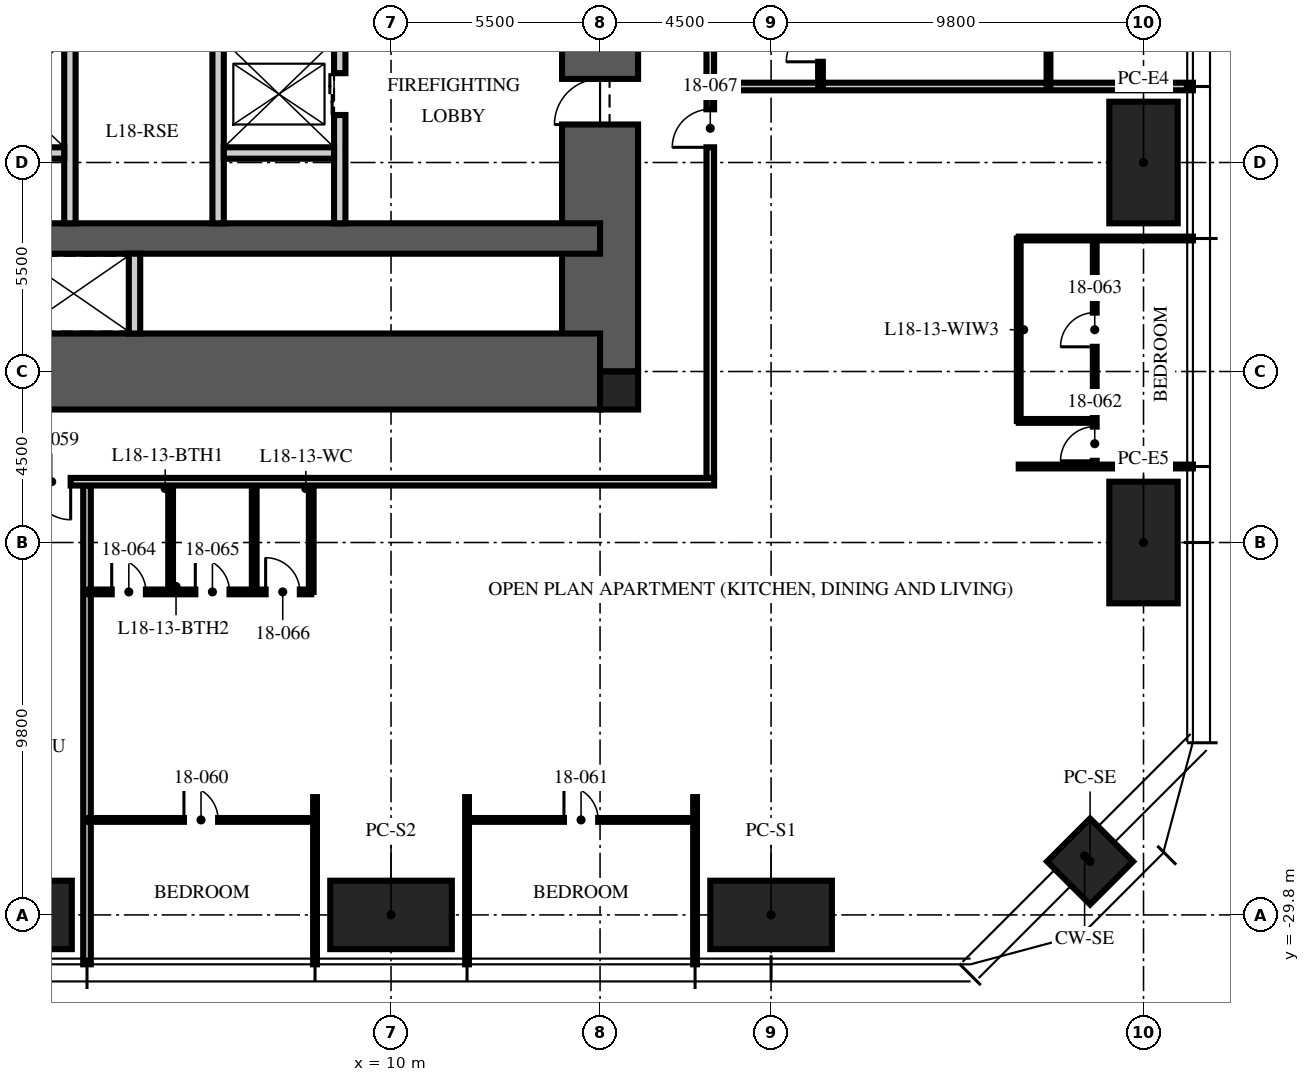
"""IFC4 building model, lengths in metres.
Left out: names, types, materials, properties, quantities, classifications, styles, units other than length and angle.
Written with IfcOpenShell. Run it as: python <this file> out.ifc"""

import sys

from ifc_helpers import new_model, si_unit, direction, frame, frame_2d, origin, origin_2d, place, context, subcontext, project, spatial, rectangle, hollow_rectangle, extrude, element, fill, save


model = new_model("IFC4")
c1 = context("Model", 3, precision=1e-05, world=origin(), true_north=direction((0.0, 1.0)))
c2 = subcontext(c1, "Body", "Model", "MODEL_VIEW")
j1 = project(units=[si_unit("LENGTHUNIT", "METRE"), si_unit("PLANEANGLEUNIT", "RADIAN")], contexts=[c1])
p1 = place(None, origin())
s1 = spatial("IfcSite", under=j1, at=p1, CompositionType="ELEMENT")
p2 = place(p1, origin())
s2 = spatial("IfcBuilding", under=s1, at=p2, CompositionType="ELEMENT")
p3 = place(p2, frame((0.0, 0.0, 73.5)))
s3 = spatial("IfcBuildingStorey", under=s2, at=p3, CompositionType="ELEMENT", Elevation=73.5)
p4 = place(p3, frame((15.5, -15.5, -0.25), z_axis=(0.0, 0.0, 1.0), x_axis=(0.0, 1.0, 0.0)))
e1 = element("IfcWall", 1, at=p4, inside=s3, PredefinedType="SHEAR", context=c2, shape_type="SweptSolid", body=[
    extrude(rectangle(XDim=31.0, YDim=2.0, at=frame_2d((15.5, 0.0))), origin(), (0.0, 0.0, 1.0), 3.75),
])
p5 = place(p4, frame((6.5, 0.0, 0.25)))
e2 = element("IfcOpeningElement", 2, at=p5, cuts=e1, PredefinedType="OPENING", context=c2, shape_type="SweptSolid", body=[
    extrude(rectangle(XDim=1.2, YDim=2.1, at=frame_2d((0.6, 1.05))), frame((0.0, 1.01, 0.0), z_axis=(0.0, -1.0, 0.0), x_axis=(1.0, 0.0, 0.0)), (0.0, 0.0, 1.0), 2.02),
])
p6 = place(p4, frame((23.0, 0.0, 0.25)))
e3 = element("IfcOpeningElement", 3, at=p6, cuts=e1, PredefinedType="OPENING", context=c2, shape_type="SweptSolid", body=[
    extrude(rectangle(XDim=1.8, YDim=2.1, at=frame_2d((0.9, 1.05))), frame((0.0, 1.01, 0.0), z_axis=(0.0, -1.0, 0.0), x_axis=(1.0, 0.0, 0.0)), (0.0, 0.0, 1.0), 2.02),
])
p7 = place(p3, frame((-15.5, -15.5, -0.25), z_axis=(0.0, 0.0, 1.0), x_axis=(1.0, 0.0, 0.0)))
e4 = element("IfcWall", 4, at=p7, inside=s3, PredefinedType="SHEAR", context=c2, shape_type="SweptSolid", body=[
    extrude(rectangle(XDim=31.0, YDim=2.0, at=frame_2d((15.5, 0.0))), origin(), (0.0, 0.0, 1.0), 3.75),
])
p8 = place(p3, frame((-15.5, -12.0, -0.25), z_axis=(0.0, 0.0, 1.0), x_axis=(1.0, 0.0, 0.0)))
e5 = element("IfcWall", 5, at=p8, inside=s3, PredefinedType="SHEAR", context=c2, shape_type="SweptSolid", body=[
    extrude(rectangle(XDim=31.0, YDim=0.8, at=frame_2d((15.5, 0.0))), origin(), (0.0, 0.0, 1.0), 3.75),
])
p9 = place(p3, frame((16.0, -16.0, -0.25), z_axis=(0.0, 0.0, 1.0), x_axis=(1.0, 0.0, 0.0)))
e6 = element("IfcColumn", 6, at=p9, inside=s3, PredefinedType="COLUMN", context=c2, shape_type="SweptSolid", body=[
    extrude(rectangle(XDim=1.0, YDim=1.0, at=origin_2d()), origin(), (0.0, 0.0, 1.0), 3.75),
])
for number, where, z_axis, x_axis in (
    (7, (29.8, -10.0, 0.0), (0.0, 0.0, 1.0), (0.0, 1.0, 0.0)),
    (8, (29.8, -20.0, 0.0), (0.0, 0.0, 1.0), (0.0, 1.0, 0.0)),
    (9, (20.0, -29.8, 0.0), (0.0, 0.0, 1.0), (1.0, 0.0, 0.0)),
    (10, (10.0, -29.8, 0.0), (0.0, 0.0, 1.0), (1.0, 0.0, 0.0)),
    (11, (0.0, -29.8, 0.0), (0.0, 0.0, 1.0), (1.0, 0.0, 0.0)),
):
    element("IfcColumn", number, at=place(p3, frame(where, z_axis=z_axis, x_axis=x_axis)), inside=s3, PredefinedType="COLUMN", context=c2, shape_type="SweptSolid", body=[
        extrude(hollow_rectangle(XDim=3.2, YDim=1.8, WallThickness=0.2, at=origin_2d()), origin(), (0.0, 0.0, 1.0), 3.75),
    ])
p10 = place(p3, frame((28.394, -28.394, 0.0), z_axis=(0.0, 0.0, 1.0), x_axis=(0.707106781187, 0.707106781187, 0.0)))
e12 = element("IfcColumn", 12, at=p10, inside=s3, PredefinedType="COLUMN", context=c2, shape_type="SweptSolid", body=[
    extrude(hollow_rectangle(XDim=1.6, YDim=1.6, WallThickness=0.1, at=origin_2d()), origin(), (0.0, 0.0, 1.0), 3.75),
])
p11 = place(p3, frame((8.65, -11.6, 0.0), z_axis=(0.0, 0.0, 1.0), x_axis=(0.0, 1.0, 0.0)))
e13 = element("IfcWall", 13, at=p11, inside=s3, PredefinedType="PARTITIONING", context=c2, shape_type="SweptSolid", body=[
    extrude(rectangle(XDim=6.7, YDim=0.3, at=frame_2d((3.35, 0.0))), origin(), (0.0, 0.0, 1.0), 3.5),
])
p12 = place(p11, frame((2.85, 0.0, 0.0)))
e14 = element("IfcOpeningElement", 14, at=p12, cuts=e13, PredefinedType="OPENING", context=c2, shape_type="SweptSolid", body=[
    extrude(rectangle(XDim=1.1, YDim=2.1, at=frame_2d((0.55, 1.05))), frame((0.0, 0.16, 0.0), z_axis=(0.0, -1.0, 0.0), x_axis=(1.0, 0.0, 0.0)), (0.0, 0.0, 1.0), 0.32),
])
for number, where, z_axis, x_axis in (
    (15, (1.55, -11.6, 0.0), (0.0, 0.0, 1.0), (0.0, 1.0, 0.0)),
    (16, (5.45, -11.6, 0.0), (0.0, 0.0, 1.0), (0.0, 1.0, 0.0)),
):
    element("IfcWall", number, at=place(p3, frame(where, z_axis=z_axis, x_axis=x_axis)), inside=s3, PredefinedType="PARTITIONING", context=c2, shape_type="SweptSolid", body=[
        extrude(rectangle(XDim=4.8, YDim=0.3, at=frame_2d((2.4, 0.0))), origin(), (0.0, 0.0, 1.0), 3.5),
    ])
for number, where, z_axis, x_axis in (
    (17, (-1.5, -9.75, 0.0), (0.0, 0.0, 1.0), (1.0, 0.0, 0.0)),
    (18, (5.6, -9.75, 0.0), (0.0, 0.0, 1.0), (1.0, 0.0, 0.0)),
):
    element("IfcWall", number, at=place(p3, frame(where, z_axis=z_axis, x_axis=x_axis)), inside=s3, PredefinedType="PARTITIONING", context=c2, shape_type="SweptSolid", body=[
        extrude(rectangle(XDim=2.9, YDim=0.3, at=frame_2d((1.45, 0.0))), origin(), (0.0, 0.0, 1.0), 3.5),
    ])
p13 = place(p3, frame((3.25, -14.5, 0.0), z_axis=(0.0, 0.0, 1.0), x_axis=(0.0, 1.0, 0.0)))
e19 = element("IfcWall", 19, at=p13, inside=s3, PredefinedType="PARTITIONING", context=c2, shape_type="SweptSolid", body=[
    extrude(rectangle(XDim=2.1, YDim=0.3, at=frame_2d((1.05, 0.0))), origin(), (0.0, 0.0, 1.0), 3.5),
])
for number, where, z_axis, x_axis in (
    (20, (18.5, -8.0, 0.0), (0.0, 0.0, 1.0), (1.0, 0.0, 0.0)),
    (21, (2.0, -18.5, 0.0), (0.0, 0.0, 1.0), (0.0, -1.0, 0.0)),
):
    element("IfcWall", number, at=place(p3, frame(where, z_axis=z_axis, x_axis=x_axis)), inside=s3, PredefinedType="PARTITIONING", context=c2, shape_type="SweptSolid", body=[
        extrude(rectangle(XDim=12.6, YDim=0.2, at=frame_2d((6.3, 0.0))), origin(), (0.0, 0.0, 1.0), 2.71),
    ])
for number, where, z_axis, x_axis in (
    (22, (8.0, -26.7, 0.0), (0.0, 0.0, 1.0), (0.0, -1.0, 0.0)),
    (23, (12.0, -26.7, 0.0), (0.0, 0.0, 1.0), (0.0, -1.0, 0.0)),
    (24, (18.0, -26.7, 0.0), (0.0, 0.0, 1.0), (0.0, -1.0, 0.0)),
):
    element("IfcWall", number, at=place(p3, frame(where, z_axis=z_axis, x_axis=x_axis)), inside=s3, PredefinedType="PARTITIONING", context=c2, shape_type="SweptSolid", body=[
        extrude(rectangle(XDim=4.4, YDim=0.1, at=frame_2d((2.2, 0.0))), origin(), (0.0, 0.0, 1.0), 2.71),
    ])
for number, where, z_axis, x_axis in (
    (25, (26.517, -18.0, 0.0), (0.0, 0.0, 1.0), (1.0, 0.0, 0.0)),
    (26, (26.517, -12.0, 0.0), (0.0, 0.0, 1.0), (1.0, 0.0, 0.0)),
):
    element("IfcWall", number, at=place(p3, frame(where, z_axis=z_axis, x_axis=x_axis)), inside=s3, PredefinedType="PARTITIONING", context=c2, shape_type="SweptSolid", body=[
        extrude(rectangle(XDim=4.583, YDim=0.1, at=frame_2d((2.292, 0.0))), origin(), (0.0, 0.0, 1.0), 2.71),
    ])
p14 = place(p3, frame((27.3, -8.0, 0.0), z_axis=(0.0, 0.0, 1.0), x_axis=(0.0, 1.0, 0.0)))
e27 = element("IfcWall", 27, at=p14, inside=s3, PredefinedType="PARTITIONING", context=c2, shape_type="SweptSolid", body=[
    extrude(rectangle(XDim=6.0, YDim=0.1, at=frame_2d((3.0, 0.0))), origin(), (0.0, 0.0, 1.0), 2.61),
])
p15 = place(p14, frame((2.55, 0.0, 0.0)))
e28 = element("IfcOpeningElement", 28, at=p15, cuts=e27, PredefinedType="OPENING", context=c2, shape_type="SweptSolid", body=[
    extrude(rectangle(XDim=0.9, YDim=2.1, at=frame_2d((0.45, 1.05))), frame((0.0, 0.06, 0.0), z_axis=(0.0, -1.0, 0.0), x_axis=(1.0, 0.0, 0.0)), (0.0, 0.0, 1.0), 0.12),
])
p16 = place(p3, frame((21.3, -8.0, 0.0), z_axis=(0.0, 0.0, 1.0), x_axis=(0.0, 1.0, 0.0)))
e29 = element("IfcWall", 29, at=p16, inside=s3, PredefinedType="PARTITIONING", context=c2, shape_type="SweptSolid", body=[
    extrude(rectangle(XDim=2.2, YDim=0.125, at=frame_2d((1.1, 0.0))), origin(), (0.0, 0.0, 1.0), 3.5),
])
p17 = place(p16, frame((0.65, 0.0, 0.0)))
e30 = element("IfcOpeningElement", 30, at=p17, cuts=e29, PredefinedType="OPENING", context=c2, shape_type="SweptSolid", body=[
    extrude(rectangle(XDim=0.9, YDim=2.1, at=frame_2d((0.45, 1.05))), frame((0.0, 0.073, 0.0), z_axis=(0.0, -1.0, 0.0), x_axis=(1.0, 0.0, 0.0)), (0.0, 0.0, 1.0), 0.145),
])
p18 = place(p3, frame((2.0, -27.3, 0.0), z_axis=(0.0, 0.0, 1.0), x_axis=(1.0, 0.0, 0.0)))
e31 = element("IfcWall", 31, at=p18, inside=s3, PredefinedType="PARTITIONING", context=c2, shape_type="SweptSolid", body=[
    extrude(rectangle(XDim=6.0, YDim=0.1, at=frame_2d((3.0, 0.0))), origin(), (0.0, 0.0, 1.0), 2.61),
])
p19 = place(p18, frame((2.55, 0.0, 0.0)))
e32 = element("IfcOpeningElement", 32, at=p19, cuts=e31, PredefinedType="OPENING", context=c2, shape_type="SweptSolid", body=[
    extrude(rectangle(XDim=0.9, YDim=2.1, at=frame_2d((0.45, 1.05))), frame((0.0, 0.06, 0.0), z_axis=(0.0, -1.0, 0.0), x_axis=(1.0, 0.0, 0.0)), (0.0, 0.0, 1.0), 0.12),
])
p20 = place(p3, frame((12.0, -27.3, 0.0), z_axis=(0.0, 0.0, 1.0), x_axis=(1.0, 0.0, 0.0)))
e33 = element("IfcWall", 33, at=p20, inside=s3, PredefinedType="PARTITIONING", context=c2, shape_type="SweptSolid", body=[
    extrude(rectangle(XDim=6.0, YDim=0.1, at=frame_2d((3.0, 0.0))), origin(), (0.0, 0.0, 1.0), 2.61),
])
p21 = place(p20, frame((2.55, 0.0, 0.0)))
e34 = element("IfcOpeningElement", 34, at=p21, cuts=e33, PredefinedType="OPENING", context=c2, shape_type="SweptSolid", body=[
    extrude(rectangle(XDim=0.9, YDim=2.1, at=frame_2d((0.45, 1.05))), frame((0.0, 0.06, 0.0), z_axis=(0.0, -1.0, 0.0), x_axis=(1.0, 0.0, 0.0)), (0.0, 0.0, 1.0), 0.12),
])
p22 = place(p3, frame((28.517, -18.0, 0.0), z_axis=(0.0, 0.0, 1.0), x_axis=(0.0, 1.0, 0.0)))
e35 = element("IfcWall", 35, at=p22, inside=s3, PredefinedType="PARTITIONING", context=c2, shape_type="SweptSolid", body=[
    extrude(rectangle(XDim=6.0, YDim=0.1, at=frame_2d((3.0, 0.0))), origin(), (0.0, 0.0, 1.0), 2.61),
])
p23 = place(p22, frame((0.15, 0.0, 0.0)))
e36 = element("IfcOpeningElement", 36, at=p23, cuts=e35, PredefinedType="OPENING", context=c2, shape_type="SweptSolid", body=[
    extrude(rectangle(XDim=0.9, YDim=2.1, at=frame_2d((0.45, 1.05))), frame((0.0, 0.06, 0.0), z_axis=(0.0, -1.0, 0.0), x_axis=(1.0, 0.0, 0.0)), (0.0, 0.0, 1.0), 0.12),
])
p24 = place(p22, frame((3.15, 0.0, 0.0)))
e37 = element("IfcOpeningElement", 37, at=p24, cuts=e35, PredefinedType="OPENING", context=c2, shape_type="SweptSolid", body=[
    extrude(rectangle(XDim=0.9, YDim=2.1, at=frame_2d((0.45, 1.05))), frame((0.0, 0.06, 0.0), z_axis=(0.0, -1.0, 0.0), x_axis=(1.0, 0.0, 0.0)), (0.0, 0.0, 1.0), 0.12),
])
p25 = place(p3, frame((26.517, -16.8, 0.0), z_axis=(0.0, 0.0, 1.0), x_axis=(1.0, 0.0, 0.0)))
e38 = element("IfcWall", 38, at=p25, inside=s3, PredefinedType="PARTITIONING", context=c2, shape_type="SweptSolid", body=[
    extrude(rectangle(XDim=2.0, YDim=0.1, at=frame_2d((1.0, 0.0))), origin(), (0.0, 0.0, 1.0), 3.5),
])
p26 = place(p3, frame((26.517, -16.8, 0.0), z_axis=(0.0, 0.0, 1.0), x_axis=(0.0, 1.0, 0.0)))
e39 = element("IfcWall", 39, at=p26, inside=s3, PredefinedType="PARTITIONING", context=c2, shape_type="SweptSolid", body=[
    extrude(rectangle(XDim=4.8, YDim=0.1, at=frame_2d((2.4, 0.0))), origin(), (0.0, 0.0, 1.0), 2.61),
])
p27 = place(p3, frame((2.0, -21.3, 0.0), z_axis=(0.0, 0.0, 1.0), x_axis=(1.0, 0.0, 0.0)))
e40 = element("IfcWall", 40, at=p27, inside=s3, PredefinedType="PARTITIONING", context=c2, shape_type="SweptSolid", body=[
    extrude(rectangle(XDim=5.9, YDim=0.125, at=frame_2d((2.95, 0.0))), origin(), (0.0, 0.0, 1.0), 2.61),
])
p28 = place(p27, frame((0.65, 0.0, 0.0)))
e41 = element("IfcOpeningElement", 41, at=p28, cuts=e40, PredefinedType="OPENING", context=c2, shape_type="SweptSolid", body=[
    extrude(rectangle(XDim=0.9, YDim=2.1, at=frame_2d((0.45, 1.05))), frame((0.0, 0.073, 0.0), z_axis=(0.0, -1.0, 0.0), x_axis=(1.0, 0.0, 0.0)), (0.0, 0.0, 1.0), 0.145),
])
p29 = place(p27, frame((2.85, 0.0, 0.0)))
e42 = element("IfcOpeningElement", 42, at=p29, cuts=e40, PredefinedType="OPENING", context=c2, shape_type="SweptSolid", body=[
    extrude(rectangle(XDim=0.9, YDim=2.1, at=frame_2d((0.45, 1.05))), frame((0.0, 0.073, 0.0), z_axis=(0.0, -1.0, 0.0), x_axis=(1.0, 0.0, 0.0)), (0.0, 0.0, 1.0), 0.145),
])
p30 = place(p27, frame((4.7, 0.0, 0.0)))
e43 = element("IfcOpeningElement", 43, at=p30, cuts=e40, PredefinedType="OPENING", context=c2, shape_type="SweptSolid", body=[
    extrude(rectangle(XDim=0.9, YDim=2.1, at=frame_2d((0.45, 1.05))), frame((0.0, 0.073, 0.0), z_axis=(0.0, -1.0, 0.0), x_axis=(1.0, 0.0, 0.0)), (0.0, 0.0, 1.0), 0.145),
])
for number, where, z_axis, x_axis in (
    (44, (4.2, -18.5, 0.0), (0.0, 0.0, 1.0), (0.0, -1.0, 0.0)),
    (45, (6.4, -18.5, 0.0), (0.0, 0.0, 1.0), (0.0, -1.0, 0.0)),
    (46, (7.9, -18.5, 0.0), (0.0, 0.0, 1.0), (0.0, -1.0, 0.0)),
):
    element("IfcWall", number, at=place(p3, frame(where, z_axis=z_axis, x_axis=x_axis)), inside=s3, PredefinedType="PARTITIONING", context=c2, shape_type="SweptSolid", body=[
        extrude(rectangle(XDim=2.8, YDim=0.125, at=frame_2d((1.4, 0.0))), origin(), (0.0, 0.0, 1.0), 3.5),
    ])
p31 = place(p3, frame((18.4, -18.3, 0.0), z_axis=(0.0, 0.0, 1.0), x_axis=(0.0, 1.0, 0.0)))
e47 = element("IfcWall", 47, at=p31, inside=s3, PredefinedType="PARTITIONING", context=c2, shape_type="SweptSolid", body=[
    extrude(rectangle(XDim=36.6, YDim=0.2, at=frame_2d((18.3, 0.0))), origin(), (0.0, 0.0, 1.0), 2.3),
])
p32 = place(p31, frame((18.57, 0.0, 0.0)))
e48 = element("IfcOpeningElement", 48, at=p32, cuts=e47, PredefinedType="OPENING", context=c2, shape_type="SweptSolid", body=[
    extrude(rectangle(XDim=1.0, YDim=2.2, at=frame_2d((0.5, 1.1))), frame((0.0, 0.11, 0.0), z_axis=(0.0, -1.0, 0.0), x_axis=(1.0, 0.0, 0.0)), (0.0, 0.0, 1.0), 0.22),
])
p33 = place(p31, frame((8.7, 0.0, 0.0)))
e49 = element("IfcOpeningElement", 49, at=p33, cuts=e47, PredefinedType="OPENING", context=c2, shape_type="SweptSolid", body=[
    extrude(rectangle(XDim=1.0, YDim=2.2, at=frame_2d((0.5, 1.1))), frame((0.0, 0.11, 0.0), z_axis=(0.0, -1.0, 0.0), x_axis=(1.0, 0.0, 0.0)), (0.0, 0.0, 1.0), 0.22),
])
p34 = place(p3, frame((18.5, -18.4, 0.0), z_axis=(0.0, 0.0, 1.0), x_axis=(-1.0, 0.0, 0.0)))
e50 = element("IfcWall", 50, at=p34, inside=s3, PredefinedType="PARTITIONING", context=c2, shape_type="SweptSolid", body=[
    extrude(rectangle(XDim=37.0, YDim=0.2, at=frame_2d((18.5, 0.0))), origin(), (0.0, 0.0, 1.0), 2.3),
])
p35 = place(p34, frame((26.93, 0.0, 0.0)))
e51 = element("IfcOpeningElement", 51, at=p35, cuts=e50, PredefinedType="OPENING", context=c2, shape_type="SweptSolid", body=[
    extrude(rectangle(XDim=1.0, YDim=2.2, at=frame_2d((0.5, 1.1))), frame((0.0, 0.11, 0.0), z_axis=(0.0, -1.0, 0.0), x_axis=(1.0, 0.0, 0.0)), (0.0, 0.0, 1.0), 0.22),
])
p36 = place(p34, frame((20.93, 0.0, 0.0)))
e52 = element("IfcOpeningElement", 52, at=p36, cuts=e50, PredefinedType="OPENING", context=c2, shape_type="SweptSolid", body=[
    extrude(rectangle(XDim=1.0, YDim=2.2, at=frame_2d((0.5, 1.1))), frame((0.0, 0.11, 0.0), z_axis=(0.0, -1.0, 0.0), x_axis=(1.0, 0.0, 0.0)), (0.0, 0.0, 1.0), 0.22),
])
p37 = place(p34, frame((16.93, 0.0, 0.0)))
e53 = element("IfcOpeningElement", 53, at=p37, cuts=e50, PredefinedType="OPENING", context=c2, shape_type="SweptSolid", body=[
    extrude(rectangle(XDim=1.0, YDim=2.2, at=frame_2d((0.5, 1.1))), frame((0.0, 0.11, 0.0), z_axis=(0.0, -1.0, 0.0), x_axis=(1.0, 0.0, 0.0)), (0.0, 0.0, 1.0), 0.22),
])
p38 = place(p5, origin())
e54 = element("IfcDoor", 54, at=p38, inside=s3, OperationType="SINGLE_SWING_LEFT", PredefinedType="DOOR", context=c2, shape_type="SweptSolid", body=[
    extrude(rectangle(XDim=1.2, YDim=2.1, at=frame_2d((0.6, 1.05))), frame((0.0, 0.025, 0.0), z_axis=(0.0, -1.0, 0.0), x_axis=(1.0, 0.0, 0.0)), (0.0, 0.0, 1.0), 0.05),
])
fill(e2, e54)
p39 = place(p12, origin())
e55 = element("IfcDoor", 55, at=p39, inside=s3, OperationType="DOUBLE_DOOR_SLIDING", PredefinedType="DOOR", context=c2, shape_type="SweptSolid", body=[
    extrude(rectangle(XDim=1.1, YDim=2.1, at=frame_2d((0.55, 1.05))), frame((0.0, 0.025, 0.0), z_axis=(0.0, -1.0, 0.0), x_axis=(1.0, 0.0, 0.0)), (0.0, 0.0, 1.0), 0.05),
])
fill(e14, e55)
p40 = place(p17, origin())
e56 = element("IfcDoor", 56, at=p40, inside=s3, OperationType="SINGLE_SWING_LEFT", PredefinedType="DOOR", context=c2, shape_type="SweptSolid", body=[
    extrude(rectangle(XDim=0.9, YDim=2.1, at=frame_2d((0.45, 1.05))), frame((0.0, 0.025, 0.0), z_axis=(0.0, -1.0, 0.0), x_axis=(1.0, 0.0, 0.0)), (0.0, 0.0, 1.0), 0.05),
])
fill(e30, e56)
p41 = place(p37, origin())
e57 = element("IfcDoor", 57, at=p41, inside=s3, OperationType="SINGLE_SWING_LEFT", PredefinedType="DOOR", context=c2, shape_type="SweptSolid", body=[
    extrude(rectangle(XDim=1.0, YDim=2.2, at=frame_2d((0.5, 1.1))), frame((0.0, 0.025, 0.0), z_axis=(0.0, -1.0, 0.0), x_axis=(1.0, 0.0, 0.0)), (0.0, 0.0, 1.0), 0.05),
])
fill(e53, e57)
p42 = place(p19, origin())
e58 = element("IfcDoor", 58, at=p42, inside=s3, OperationType="SINGLE_SWING_LEFT", PredefinedType="DOOR", context=c2, shape_type="SweptSolid", body=[
    extrude(rectangle(XDim=0.9, YDim=2.1, at=frame_2d((0.45, 1.05))), frame((0.0, 0.025, 0.0), z_axis=(0.0, -1.0, 0.0), x_axis=(1.0, 0.0, 0.0)), (0.0, 0.0, 1.0), 0.05),
])
fill(e32, e58)
p43 = place(p21, origin())
e59 = element("IfcDoor", 59, at=p43, inside=s3, OperationType="SINGLE_SWING_LEFT", PredefinedType="DOOR", context=c2, shape_type="SweptSolid", body=[
    extrude(rectangle(XDim=0.9, YDim=2.1, at=frame_2d((0.45, 1.05))), frame((0.0, 0.025, 0.0), z_axis=(0.0, -1.0, 0.0), x_axis=(1.0, 0.0, 0.0)), (0.0, 0.0, 1.0), 0.05),
])
fill(e34, e59)
p44 = place(p23, origin())
e60 = element("IfcDoor", 60, at=p44, inside=s3, OperationType="SINGLE_SWING_LEFT", PredefinedType="DOOR", context=c2, shape_type="SweptSolid", body=[
    extrude(rectangle(XDim=0.9, YDim=2.1, at=frame_2d((0.45, 1.05))), frame((0.0, 0.025, 0.0), z_axis=(0.0, -1.0, 0.0), x_axis=(1.0, 0.0, 0.0)), (0.0, 0.0, 1.0), 0.05),
])
fill(e36, e60)
p45 = place(p24, origin())
e61 = element("IfcDoor", 61, at=p45, inside=s3, OperationType="SINGLE_SWING_LEFT", PredefinedType="DOOR", context=c2, shape_type="SweptSolid", body=[
    extrude(rectangle(XDim=0.9, YDim=2.1, at=frame_2d((0.45, 1.05))), frame((0.0, 0.025, 0.0), z_axis=(0.0, -1.0, 0.0), x_axis=(1.0, 0.0, 0.0)), (0.0, 0.0, 1.0), 0.05),
])
fill(e37, e61)
p46 = place(p28, origin())
e62 = element("IfcDoor", 62, at=p46, inside=s3, OperationType="SINGLE_SWING_LEFT", PredefinedType="DOOR", context=c2, shape_type="SweptSolid", body=[
    extrude(rectangle(XDim=0.9, YDim=2.1, at=frame_2d((0.45, 1.05))), frame((0.0, 0.025, 0.0), z_axis=(0.0, -1.0, 0.0), x_axis=(1.0, 0.0, 0.0)), (0.0, 0.0, 1.0), 0.05),
])
fill(e41, e62)
p47 = place(p29, origin())
e63 = element("IfcDoor", 63, at=p47, inside=s3, OperationType="SINGLE_SWING_LEFT", PredefinedType="DOOR", context=c2, shape_type="SweptSolid", body=[
    extrude(rectangle(XDim=0.9, YDim=2.1, at=frame_2d((0.45, 1.05))), frame((0.0, 0.025, 0.0), z_axis=(0.0, -1.0, 0.0), x_axis=(1.0, 0.0, 0.0)), (0.0, 0.0, 1.0), 0.05),
])
fill(e42, e63)
p48 = place(p30, origin())
e64 = element("IfcDoor", 64, at=p48, inside=s3, OperationType="SINGLE_SWING_LEFT", PredefinedType="DOOR", context=c2, shape_type="SweptSolid", body=[
    extrude(rectangle(XDim=0.9, YDim=2.1, at=frame_2d((0.45, 1.05))), frame((0.0, 0.025, 0.0), z_axis=(0.0, -1.0, 0.0), x_axis=(1.0, 0.0, 0.0)), (0.0, 0.0, 1.0), 0.05),
])
fill(e43, e64)
p49 = place(p33, origin())
e65 = element("IfcDoor", 65, at=p49, inside=s3, OperationType="SINGLE_SWING_LEFT", PredefinedType="DOOR", context=c2, shape_type="SweptSolid", body=[
    extrude(rectangle(XDim=1.0, YDim=2.2, at=frame_2d((0.5, 1.1))), frame((0.0, 0.025, 0.0), z_axis=(0.0, -1.0, 0.0), x_axis=(1.0, 0.0, 0.0)), (0.0, 0.0, 1.0), 0.05),
])
fill(e49, e65)
save(model, sys.argv[1])
